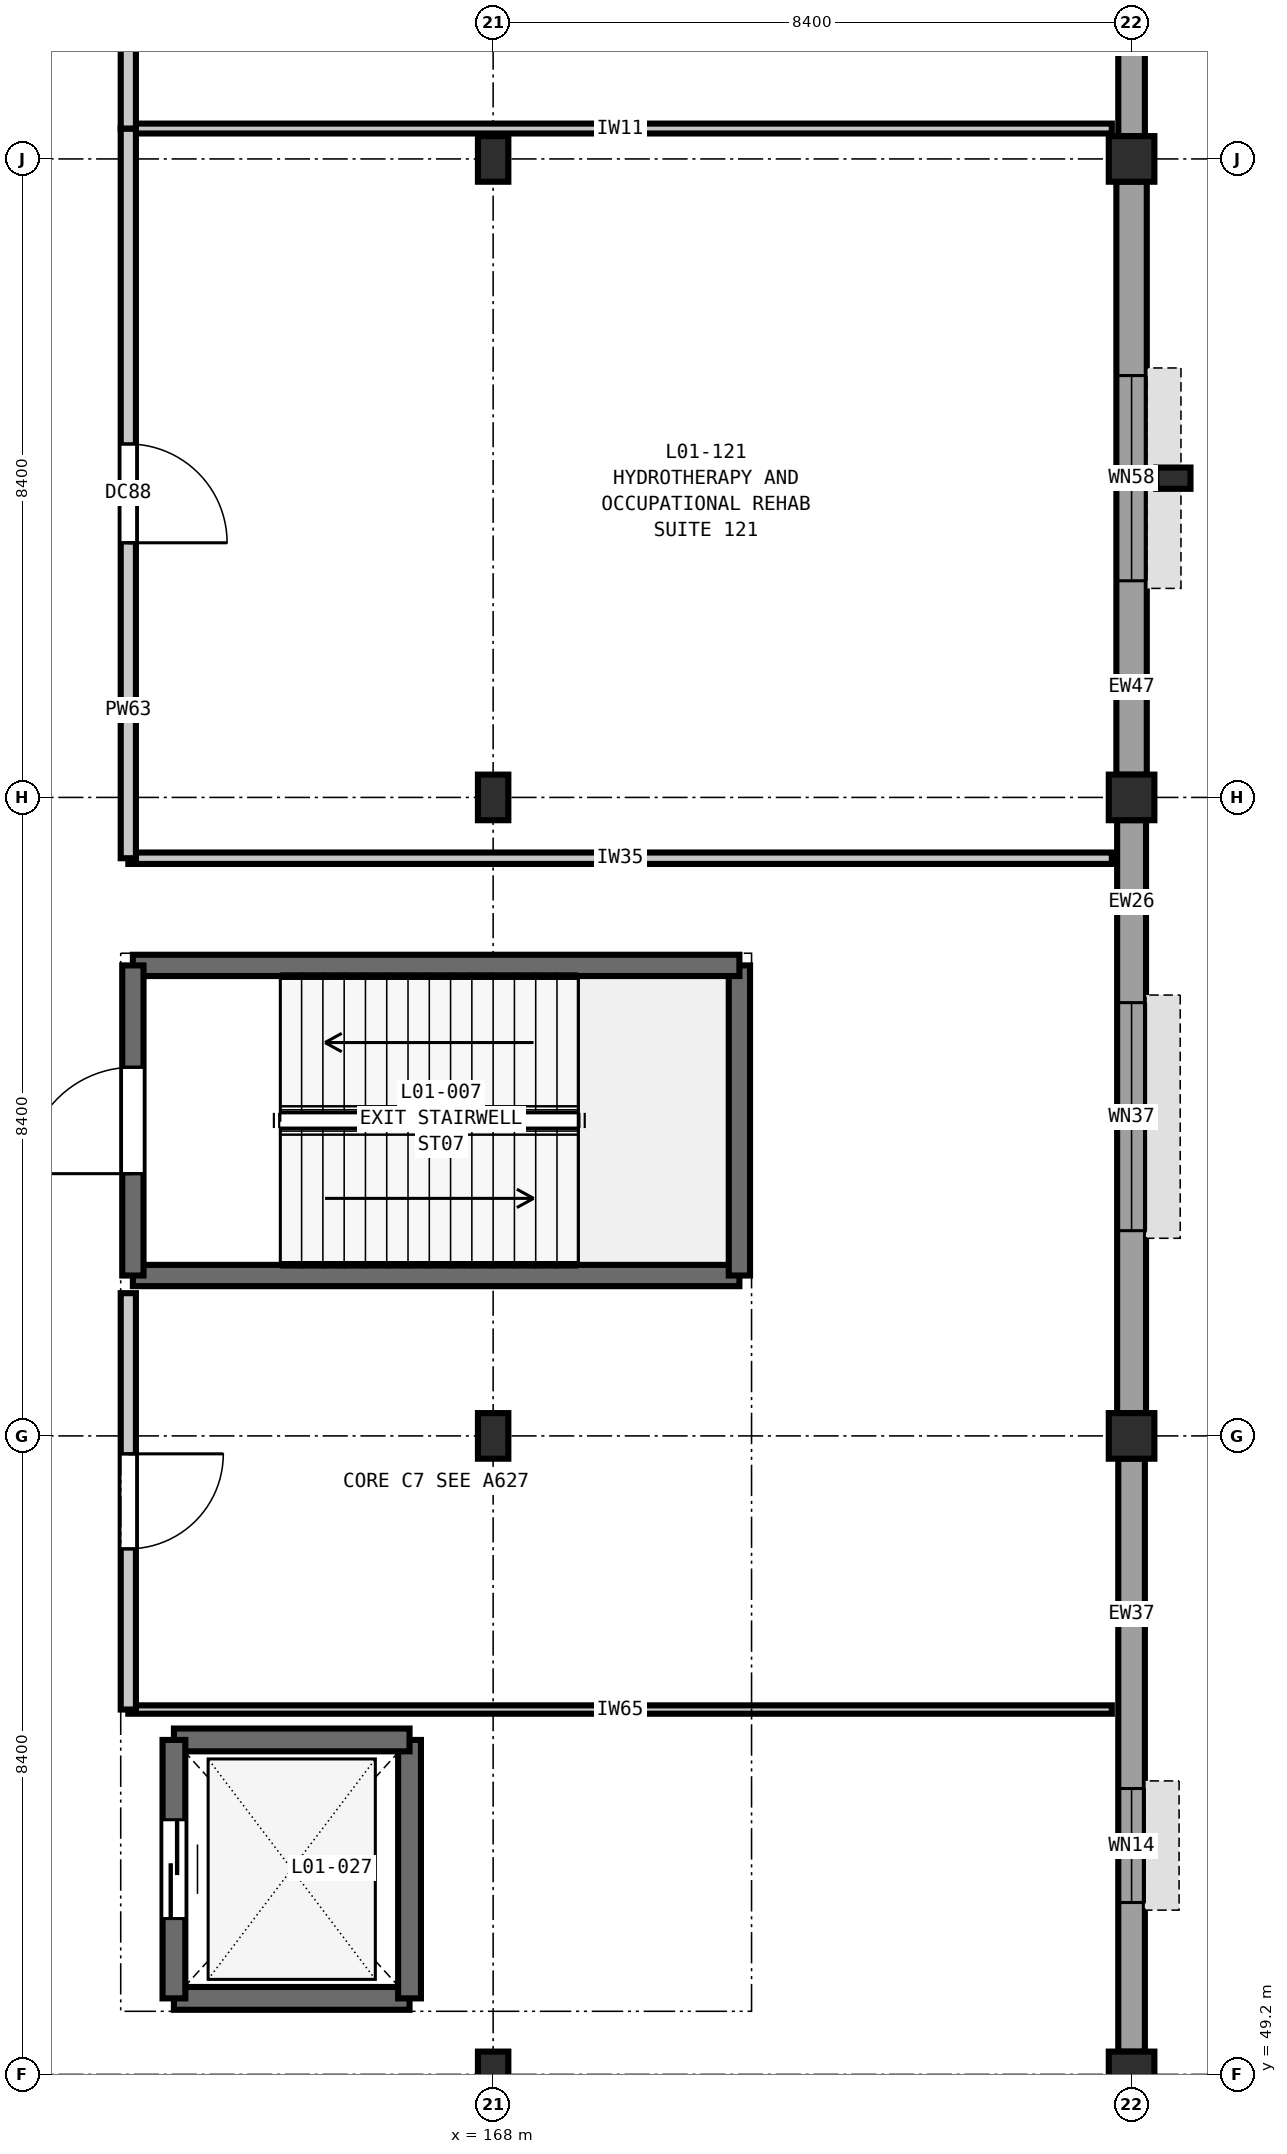
"""IFC4 building model, lengths in metres.
Left out: names, types, materials, properties, quantities, classifications, styles, units other than length and angle.
Written with IfcOpenShell. Run it as: python <this file> out.ifc"""

import sys

from ifc_helpers import new_model, si_unit, direction, frame, frame_2d, origin, origin_2d, place, context, subcontext, project, spatial, rectangle, extrude, element, fill, save


model = new_model("IFC4")
c1 = context("Model", 3, precision=1e-05, world=origin(), true_north=direction((0.0, 1.0)))
c2 = subcontext(c1, "Body", "Model", "MODEL_VIEW")
j1 = project(units=[si_unit("LENGTHUNIT", "METRE"), si_unit("PLANEANGLEUNIT", "RADIAN")], contexts=[c1])
p1 = place(None, origin())
s1 = spatial("IfcSite", under=j1, at=p1, CompositionType="ELEMENT")
p2 = place(p1, origin())
s2 = spatial("IfcBuilding", under=s1, at=p2, CompositionType="ELEMENT")
p3 = place(p2, frame((0.0, 0.0, 5.4)))
s3 = spatial("IfcBuildingStorey", under=s2, at=p3, CompositionType="ELEMENT", Elevation=5.4)
for number, where, z_axis, x_axis in (
    (1, (168.0, 49.2, 0.0), (0.0, 0.0, 1.0), (1.0, 0.0, 0.0)),
    (2, (168.0, 57.6, 0.0), (0.0, 0.0, 1.0), (1.0, 0.0, 0.0)),
    (3, (168.0, 66.0, 0.0), (0.0, 0.0, 1.0), (1.0, 0.0, 0.0)),
    (4, (168.0, 74.4, 0.0), (0.0, 0.0, 1.0), (1.0, 0.0, 0.0)),
):
    element("IfcColumn", number, at=place(p3, frame(where, z_axis=z_axis, x_axis=x_axis)), inside=s3, PredefinedType="COLUMN", context=c2, shape_type="SweptSolid", body=[
        extrude(rectangle(XDim=0.4, YDim=0.6, at=origin_2d()), origin(), (0.0, 0.0, 1.0), 5.4),
    ])
for number, where, z_axis, x_axis in (
    (5, (176.4, 49.2, 0.0), (0.0, 0.0, 1.0), (1.0, 0.0, 0.0)),
    (6, (176.4, 57.6, 0.0), (0.0, 0.0, 1.0), (1.0, 0.0, 0.0)),
    (7, (176.4, 66.0, 0.0), (0.0, 0.0, 1.0), (1.0, 0.0, 0.0)),
    (8, (176.4, 74.4, 0.0), (0.0, 0.0, 1.0), (1.0, 0.0, 0.0)),
):
    element("IfcColumn", number, at=place(p3, frame(where, z_axis=z_axis, x_axis=x_axis)), inside=s3, PredefinedType="COLUMN", context=c2, shape_type="SweptSolid", body=[
        extrude(rectangle(XDim=0.6, YDim=0.6, at=origin_2d()), origin(), (0.0, 0.0, 1.0), 5.4),
    ])
p4 = place(p3, frame((176.95, 70.2, 0.0), z_axis=(0.0, 0.0, 1.0), x_axis=(1.0, 0.0, 0.0)))
e9 = element("IfcColumn", 9, at=p4, inside=s3, PredefinedType="PILASTER", context=c2, shape_type="SweptSolid", body=[
    extrude(rectangle(XDim=0.45, YDim=0.28, at=origin_2d()), origin(), (0.0, 0.0, 1.0), 5.4),
])
p5 = place(p3, frame((176.4, 82.502, 0.0), z_axis=(0.0, 0.0, 1.0), x_axis=(0.0, -1.0, 0.0)))
e10 = element("IfcWall", 10, at=p5, inside=s3, PredefinedType="SOLIDWALL", context=c2, shape_type="SweptSolid", body=[
    extrude(rectangle(XDim=7.804, YDim=0.35, at=frame_2d((3.902, 0.0))), origin(), (0.0, 0.0, 1.0), 4.68),
])
p6 = place(p5, frame((2.702, 0.0, 0.9)))
e11 = element("IfcOpeningElement", 11, at=p6, cuts=e10, PredefinedType="OPENING", context=c2, shape_type="SweptSolid", body=[
    extrude(rectangle(XDim=2.4, YDim=2.15, at=frame_2d((1.2, 1.075))), frame((0.0, 0.185, 0.0), z_axis=(0.0, -1.0, 0.0), x_axis=(1.0, 0.0, 0.0)), (0.0, 0.0, 1.0), 0.37),
])
p7 = place(p3, frame((176.4, 74.102, 0.0), z_axis=(0.0, 0.0, 1.0), x_axis=(0.0, -1.0, 0.0)))
e12 = element("IfcWall", 12, at=p7, inside=s3, PredefinedType="SOLIDWALL", context=c2, shape_type="SweptSolid", body=[
    extrude(rectangle(XDim=7.804, YDim=0.4, at=frame_2d((3.902, 0.0))), origin(), (0.0, 0.0, 1.0), 4.68),
])
p8 = place(p7, frame((2.552, 0.0, 0.9)))
e13 = element("IfcOpeningElement", 13, at=p8, cuts=e12, PredefinedType="OPENING", context=c2, shape_type="SweptSolid", body=[
    extrude(rectangle(XDim=2.7, YDim=2.15, at=frame_2d((1.35, 1.075))), frame((0.0, 0.21, 0.0), z_axis=(0.0, -1.0, 0.0), x_axis=(1.0, 0.0, 0.0)), (0.0, 0.0, 1.0), 0.42),
])
p9 = place(p3, frame((176.4, 65.702, 0.0), z_axis=(0.0, 0.0, 1.0), x_axis=(0.0, -1.0, 0.0)))
e14 = element("IfcWall", 14, at=p9, inside=s3, PredefinedType="SOLIDWALL", context=c2, shape_type="SweptSolid", body=[
    extrude(rectangle(XDim=7.804, YDim=0.38, at=frame_2d((3.902, 0.0))), origin(), (0.0, 0.0, 1.0), 4.68),
])
p10 = place(p9, frame((2.402, 0.0, 0.9)))
e15 = element("IfcOpeningElement", 15, at=p10, cuts=e14, PredefinedType="OPENING", context=c2, shape_type="SweptSolid", body=[
    extrude(rectangle(XDim=3.0, YDim=2.15, at=frame_2d((1.5, 1.075))), frame((0.0, 0.2, 0.0), z_axis=(0.0, -1.0, 0.0), x_axis=(1.0, 0.0, 0.0)), (0.0, 0.0, 1.0), 0.4),
])
p11 = place(p3, frame((176.4, 57.302, 0.0), z_axis=(0.0, 0.0, 1.0), x_axis=(0.0, -1.0, 0.0)))
e16 = element("IfcWall", 16, at=p11, inside=s3, PredefinedType="SOLIDWALL", context=c2, shape_type="SweptSolid", body=[
    extrude(rectangle(XDim=7.804, YDim=0.35, at=frame_2d((3.902, 0.0))), origin(), (0.0, 0.0, 1.0), 4.68),
])
p12 = place(p11, frame((4.341, 0.0, 0.9)))
e17 = element("IfcOpeningElement", 17, at=p12, cuts=e16, PredefinedType="OPENING", context=c2, shape_type="SweptSolid", body=[
    extrude(rectangle(XDim=1.5, YDim=2.35, at=frame_2d((0.75, 1.175))), frame((0.0, 0.185, 0.0), z_axis=(0.0, -1.0, 0.0), x_axis=(1.0, 0.0, 0.0)), (0.0, 0.0, 1.0), 0.37),
])
p13 = place(p3, frame((163.26, 59.71, 0.0), z_axis=(0.0, 0.0, 1.0), x_axis=(1.0, 0.0, 0.0)))
e18 = element("IfcWall", 18, at=p13, inside=s3, PredefinedType="SHEAR", context=c2, shape_type="SweptSolid", body=[
    extrude(rectangle(XDim=7.98, YDim=0.28, at=frame_2d((3.99, 0.0))), origin(), (0.0, 0.0, 1.0), 5.4),
])
p14 = place(p3, frame((171.24, 59.71, 0.0), z_axis=(0.0, 0.0, 1.0), x_axis=(0.0, 1.0, 0.0)))
e19 = element("IfcWall", 19, at=p14, inside=s3, PredefinedType="SHEAR", context=c2, shape_type="SweptSolid", body=[
    extrude(rectangle(XDim=4.08, YDim=0.28, at=frame_2d((2.04, 0.0))), origin(), (0.0, 0.0, 1.0), 5.4),
])
p15 = place(p3, frame((171.24, 63.79, 0.0), z_axis=(0.0, 0.0, 1.0), x_axis=(-1.0, 0.0, 0.0)))
e20 = element("IfcWall", 20, at=p15, inside=s3, PredefinedType="SHEAR", context=c2, shape_type="SweptSolid", body=[
    extrude(rectangle(XDim=7.98, YDim=0.28, at=frame_2d((3.99, 0.0))), origin(), (0.0, 0.0, 1.0), 5.4),
])
p16 = place(p3, frame((163.26, 63.79, 0.0), z_axis=(0.0, 0.0, 1.0), x_axis=(0.0, -1.0, 0.0)))
e21 = element("IfcWall", 21, at=p16, inside=s3, PredefinedType="SHEAR", context=c2, shape_type="SweptSolid", body=[
    extrude(rectangle(XDim=4.08, YDim=0.28, at=frame_2d((2.04, 0.0))), origin(), (0.0, 0.0, 1.0), 5.4),
])
p17 = place(p16, frame((1.34, 0.0, 0.0)))
e22 = element("IfcOpeningElement", 22, at=p17, cuts=e21, PredefinedType="OPENING", context=c2, shape_type="SweptSolid", body=[
    extrude(rectangle(XDim=1.4, YDim=2.2, at=frame_2d((0.7, 1.1))), frame((0.0, 0.15, 0.0), z_axis=(0.0, -1.0, 0.0), x_axis=(1.0, 0.0, 0.0)), (0.0, 0.0, 1.0), 0.3),
])
p18 = place(p3, frame((163.8, 50.2, 0.0), z_axis=(0.0, 0.0, 1.0), x_axis=(1.0, 0.0, 0.0)))
e23 = element("IfcWall", 23, at=p18, inside=s3, PredefinedType="SHEAR", context=c2, shape_type="SweptSolid", body=[
    extrude(rectangle(XDim=3.1, YDim=0.3, at=frame_2d((1.55, 0.0))), origin(), (0.0, 0.0, 1.0), 5.4),
])
p19 = place(p3, frame((166.9, 50.2, 0.0), z_axis=(0.0, 0.0, 1.0), x_axis=(0.0, 1.0, 0.0)))
e24 = element("IfcWall", 24, at=p19, inside=s3, PredefinedType="SHEAR", context=c2, shape_type="SweptSolid", body=[
    extrude(rectangle(XDim=3.4, YDim=0.3, at=frame_2d((1.7, 0.0))), origin(), (0.0, 0.0, 1.0), 5.4),
])
p20 = place(p3, frame((166.9, 53.6, 0.0), z_axis=(0.0, 0.0, 1.0), x_axis=(-1.0, 0.0, 0.0)))
e25 = element("IfcWall", 25, at=p20, inside=s3, PredefinedType="SHEAR", context=c2, shape_type="SweptSolid", body=[
    extrude(rectangle(XDim=3.1, YDim=0.3, at=frame_2d((1.55, 0.0))), origin(), (0.0, 0.0, 1.0), 5.4),
])
p21 = place(p3, frame((163.8, 53.6, 0.0), z_axis=(0.0, 0.0, 1.0), x_axis=(0.0, -1.0, 0.0)))
e26 = element("IfcWall", 26, at=p21, inside=s3, PredefinedType="SHEAR", context=c2, shape_type="SweptSolid", body=[
    extrude(rectangle(XDim=3.4, YDim=0.3, at=frame_2d((1.7, 0.0))), origin(), (0.0, 0.0, 1.0), 5.4),
])
p22 = place(p21, frame((1.05, 0.0, 0.0)))
e27 = element("IfcOpeningElement", 27, at=p22, cuts=e26, PredefinedType="OPENING", context=c2, shape_type="SweptSolid", body=[
    extrude(rectangle(XDim=1.3, YDim=2.2, at=frame_2d((0.65, 1.1))), frame((0.0, 0.16, 0.0), z_axis=(0.0, -1.0, 0.0), x_axis=(1.0, 0.0, 0.0)), (0.0, 0.0, 1.0), 0.32),
])
p23 = place(p3, frame((163.2, 54.0, 0.0), z_axis=(0.0, 0.0, 1.0), x_axis=(1.0, 0.0, 0.0)))
e28 = element("IfcWall", 28, at=p23, inside=s3, PredefinedType="PARTITIONING", context=c2, shape_type="SweptSolid", body=[
    extrude(rectangle(XDim=12.94, YDim=0.11, at=frame_2d((6.47, 0.0))), origin(), (0.0, 0.0, 1.0), 5.05),
])
p24 = place(p3, frame((163.2, 65.2, 0.0), z_axis=(0.0, 0.0, 1.0), x_axis=(1.0, 0.0, 0.0)))
e29 = element("IfcWall", 29, at=p24, inside=s3, PredefinedType="PARTITIONING", context=c2, shape_type="SweptSolid", body=[
    extrude(rectangle(XDim=12.94, YDim=0.15, at=frame_2d((6.47, 0.0))), origin(), (0.0, 0.0, 1.0), 5.05),
])
p25 = place(p3, frame((163.2, 74.8, 0.0), z_axis=(0.0, 0.0, 1.0), x_axis=(1.0, 0.0, 0.0)))
e30 = element("IfcWall", 30, at=p25, inside=s3, PredefinedType="PARTITIONING", context=c2, shape_type="SweptSolid", body=[
    extrude(rectangle(XDim=12.94, YDim=0.13, at=frame_2d((6.47, 0.0))), origin(), (0.0, 0.0, 1.0), 5.05),
])
p26 = place(p3, frame((163.2, 54.0, 0.0), z_axis=(0.0, 0.0, 1.0), x_axis=(0.0, 1.0, 0.0)))
e31 = element("IfcWall", 31, at=p26, inside=s3, PredefinedType="PARTITIONING", context=c2, shape_type="SweptSolid", body=[
    extrude(rectangle(XDim=5.478, YDim=0.2, at=frame_2d((2.739, 0.0))), origin(), (0.0, 0.0, 1.0), 5.05),
])
p27 = place(p26, frame((2.114, 0.0, 0.0)))
e32 = element("IfcOpeningElement", 32, at=p27, cuts=e31, PredefinedType="OPENING", context=c2, shape_type="SweptSolid", body=[
    extrude(rectangle(XDim=1.25, YDim=2.15, at=frame_2d((0.625, 1.075))), frame((0.0, 0.11, 0.0), z_axis=(0.0, -1.0, 0.0), x_axis=(1.0, 0.0, 0.0)), (0.0, 0.0, 1.0), 0.22),
])
p28 = place(p3, frame((163.2, 65.2, 0.0), z_axis=(0.0, 0.0, 1.0), x_axis=(0.0, 1.0, 0.0)))
e33 = element("IfcWall", 33, at=p28, inside=s3, PredefinedType="PARTITIONING", context=c2, shape_type="SweptSolid", body=[
    extrude(rectangle(XDim=9.6, YDim=0.2, at=frame_2d((4.8, 0.0))), origin(), (0.0, 0.0, 1.0), 5.05),
])
p29 = place(p28, frame((4.15, 0.0, 0.0)))
e34 = element("IfcOpeningElement", 34, at=p29, cuts=e33, PredefinedType="OPENING", context=c2, shape_type="SweptSolid", body=[
    extrude(rectangle(XDim=1.3, YDim=2.2, at=frame_2d((0.65, 1.1))), frame((0.0, 0.11, 0.0), z_axis=(0.0, -1.0, 0.0), x_axis=(1.0, 0.0, 0.0)), (0.0, 0.0, 1.0), 0.22),
])
p30 = place(p3, frame((163.2, 74.8, 0.0), z_axis=(0.0, 0.0, 1.0), x_axis=(0.0, 1.0, 0.0)))
e35 = element("IfcWall", 35, at=p30, inside=s3, PredefinedType="PARTITIONING", context=c2, shape_type="SweptSolid", body=[
    extrude(rectangle(XDim=8.0, YDim=0.2, at=frame_2d((4.0, 0.0))), origin(), (0.0, 0.0, 1.0), 5.05),
])
p31 = place(p30, frame((3.325, 0.0, 0.0)))
e36 = element("IfcOpeningElement", 36, at=p31, cuts=e35, PredefinedType="OPENING", context=c2, shape_type="SweptSolid", body=[
    extrude(rectangle(XDim=1.35, YDim=2.2, at=frame_2d((0.675, 1.1))), frame((0.0, 0.11, 0.0), z_axis=(0.0, -1.0, 0.0), x_axis=(1.0, 0.0, 0.0)), (0.0, 0.0, 1.0), 0.22),
])
p32 = place(p8, origin())
e37 = element("IfcWindow", 37, at=p32, inside=s3, PartitioningType="DOUBLE_PANEL_VERTICAL", PredefinedType="WINDOW", context=c2, shape_type="SweptSolid", body=[
    extrude(rectangle(XDim=2.7, YDim=2.15, at=frame_2d((1.35, 1.075))), frame((0.0, 0.03, 0.0), z_axis=(0.0, -1.0, 0.0), x_axis=(1.0, 0.0, 0.0)), (0.0, 0.0, 1.0), 0.06),
])
fill(e13, e37)
p33 = place(p10, origin())
e38 = element("IfcWindow", 38, at=p33, inside=s3, PartitioningType="DOUBLE_PANEL_VERTICAL", PredefinedType="WINDOW", context=c2, shape_type="SweptSolid", body=[
    extrude(rectangle(XDim=3.0, YDim=2.15, at=frame_2d((1.5, 1.075))), frame((0.0, 0.03, 0.0), z_axis=(0.0, -1.0, 0.0), x_axis=(1.0, 0.0, 0.0)), (0.0, 0.0, 1.0), 0.06),
])
fill(e15, e38)
p34 = place(p12, origin())
e39 = element("IfcWindow", 39, at=p34, inside=s3, PartitioningType="SINGLE_PANEL", PredefinedType="WINDOW", context=c2, shape_type="SweptSolid", body=[
    extrude(rectangle(XDim=1.5, YDim=2.35, at=frame_2d((0.75, 1.175))), frame((0.0, 0.03, 0.0), z_axis=(0.0, -1.0, 0.0), x_axis=(1.0, 0.0, 0.0)), (0.0, 0.0, 1.0), 0.06),
])
fill(e17, e39)
p35 = place(p17, frame((1.4, 0.0, 0.0), z_axis=(0.0, 0.0, 1.0), x_axis=(-1.0, 0.0, 0.0)))
e40 = element("IfcDoor", 40, at=p35, inside=s3, OperationType="SINGLE_SWING_LEFT", PredefinedType="DOOR", context=c2, shape_type="SweptSolid", body=[
    extrude(rectangle(XDim=1.4, YDim=2.2, at=frame_2d((0.7, 1.1))), frame((0.0, 0.025, 0.0), z_axis=(0.0, -1.0, 0.0), x_axis=(1.0, 0.0, 0.0)), (0.0, 0.0, 1.0), 0.05),
])
fill(e22, e40)
p36 = place(p22, origin())
e41 = element("IfcDoor", 41, at=p36, inside=s3, OperationType="DOUBLE_DOOR_SLIDING", PredefinedType="DOOR", context=c2, shape_type="SweptSolid", body=[
    extrude(rectangle(XDim=1.3, YDim=2.2, at=frame_2d((0.65, 1.1))), frame((0.0, 0.025, 0.0), z_axis=(0.0, -1.0, 0.0), x_axis=(1.0, 0.0, 0.0)), (0.0, 0.0, 1.0), 0.05),
])
fill(e27, e41)
p37 = place(p27, frame((1.25, 0.0, 0.0), z_axis=(0.0, 0.0, 1.0), x_axis=(-1.0, 0.0, 0.0)))
e42 = element("IfcDoor", 42, at=p37, inside=s3, OperationType="SINGLE_SWING_LEFT", PredefinedType="DOOR", context=c2, shape_type="SweptSolid", body=[
    extrude(rectangle(XDim=1.25, YDim=2.15, at=frame_2d((0.625, 1.075))), frame((0.0, 0.025, 0.0), z_axis=(0.0, -1.0, 0.0), x_axis=(1.0, 0.0, 0.0)), (0.0, 0.0, 1.0), 0.05),
])
fill(e32, e42)
p38 = place(p29, frame((1.3, 0.0, 0.0), z_axis=(0.0, 0.0, 1.0), x_axis=(-1.0, 0.0, 0.0)))
e43 = element("IfcDoor", 43, at=p38, inside=s3, OperationType="SINGLE_SWING_RIGHT", PredefinedType="DOOR", context=c2, shape_type="SweptSolid", body=[
    extrude(rectangle(XDim=1.3, YDim=2.2, at=frame_2d((0.65, 1.1))), frame((0.0, 0.025, 0.0), z_axis=(0.0, -1.0, 0.0), x_axis=(1.0, 0.0, 0.0)), (0.0, 0.0, 1.0), 0.05),
])
fill(e34, e43)
save(model, sys.argv[1])
